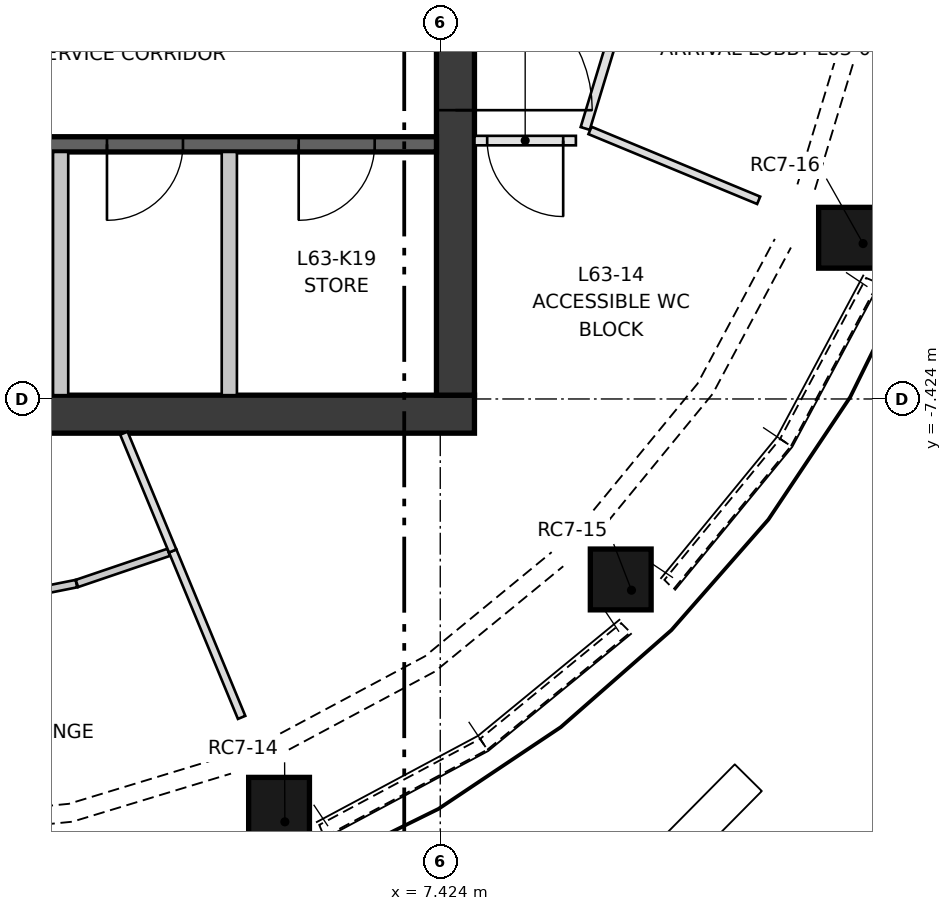
"""IFC4 building model, lengths in metres.
Left out: names, types, materials, properties, quantities, classifications, styles, units other than length and angle.
Written with IfcOpenShell. Run it as: python <this file> out.ifc"""

import sys

from ifc_helpers import new_model, si_unit, direction, frame, frame_2d, origin, origin_2d, place, context, subcontext, project, spatial, polyline, rectangle, outline, extrude, element, fill, save


model = new_model("IFC4")
c1 = context("Model", 3, precision=1e-05, world=origin(), true_north=direction((0.0, 1.0)))
c2 = subcontext(c1, "Body", "Model", "MODEL_VIEW")
j1 = project(units=[si_unit("LENGTHUNIT", "METRE"), si_unit("PLANEANGLEUNIT", "RADIAN")], contexts=[c1])
p1 = place(None, origin())
s1 = spatial("IfcSite", under=j1, at=p1, CompositionType="ELEMENT")
p2 = place(p1, origin())
s2 = spatial("IfcBuilding", under=s1, at=p2, CompositionType="ELEMENT")
p3 = place(p2, frame((0.0, 0.0, 231.2)))
s3 = spatial("IfcBuildingStorey", under=s2, at=p3, CompositionType="ELEMENT", Elevation=231.2)
p4 = place(p3, frame((5.379, -12.987, 0.5), z_axis=(0.0, 0.0, 1.0), x_axis=(-0.923896423382, -0.382642651649, 0.0)))
e1 = element("IfcColumn", 1, at=p4, inside=s3, PredefinedType="COLUMN", context=c2, shape_type="SweptSolid", body=[
    extrude(rectangle(XDim=0.8, YDim=0.8, at=origin_2d()), origin(), (0.0, -0.275, 0.962), 3.328),
])
p5 = place(p3, frame((9.94, -9.94, 0.5), z_axis=(0.0, 0.0, 1.0), x_axis=(-0.707106781187, -0.707106781187, 0.0)))
e2 = element("IfcColumn", 2, at=p5, inside=s3, PredefinedType="COLUMN", context=c2, shape_type="SweptSolid", body=[
    extrude(rectangle(XDim=0.8, YDim=0.8, at=origin_2d()), origin(), (0.0, -0.275, 0.962), 3.328),
])
p6 = place(p3, frame((12.987, -5.379, 0.5), z_axis=(0.0, 0.0, 1.0), x_axis=(-0.382642651649, -0.923896423382, 0.0)))
e3 = element("IfcColumn", 3, at=p6, inside=s3, PredefinedType="COLUMN", context=c2, shape_type="SweptSolid", body=[
    extrude(rectangle(XDim=0.8, YDim=0.8, at=origin_2d()), origin(), (0.0, -0.275, 0.962), 3.328),
])
p7 = place(p3, frame((-7.874, -7.624, 0.0), z_axis=(0.0, 0.0, 1.0), x_axis=(1.0, 0.0, 0.0)))
e4 = element("IfcWall", 4, at=p7, inside=s3, PredefinedType="SHEAR", context=c2, shape_type="SweptSolid", body=[
    extrude(rectangle(XDim=15.748, YDim=0.5, at=frame_2d((7.874, 0.0))), origin(), (0.0, 0.0, 1.0), 3.3),
])
p8 = place(p3, frame((7.624, -7.374, 0.0), z_axis=(0.0, 0.0, 1.0), x_axis=(0.0, 1.0, 0.0)))
e5 = element("IfcWall", 5, at=p8, inside=s3, PredefinedType="SHEAR", context=c2, shape_type="SweptSolid", body=[
    extrude(rectangle(XDim=14.748, YDim=0.5, at=frame_2d((7.374, 0.0))), origin(), (0.0, 0.0, 1.0), 3.3),
])
p9 = place(p8, frame((6.874, 0.0, 0.0)))
e6 = element("IfcOpeningElement", 6, at=p9, cuts=e5, PredefinedType="OPENING", context=c2, shape_type="SweptSolid", body=[
    extrude(rectangle(XDim=1.0, YDim=2.1, at=frame_2d((0.5, 1.05))), frame((0.0, 0.26, 0.0), z_axis=(0.0, -1.0, 0.0), x_axis=(1.0, 0.0, 0.0)), (0.0, 0.0, 1.0), 0.52),
])
p10 = place(p8, frame((3.75, 0.0, 0.0)))
e7 = element("IfcOpeningElement", 7, at=p10, cuts=e5, PredefinedType="OPENING", context=c2, shape_type="SweptSolid", body=[
    extrude(rectangle(XDim=1.8, YDim=2.1, at=frame_2d((0.9, 1.05))), frame((0.0, 0.26, 0.0), z_axis=(0.0, -1.0, 0.0), x_axis=(1.0, 0.0, 0.0)), (0.0, 0.0, 1.0), 0.52),
])
p11 = place(p8, frame((9.198, 0.0, 0.0)))
e8 = element("IfcOpeningElement", 8, at=p11, cuts=e5, PredefinedType="OPENING", context=c2, shape_type="SweptSolid", body=[
    extrude(rectangle(XDim=1.8, YDim=2.1, at=frame_2d((0.9, 1.05))), frame((0.0, 0.26, 0.0), z_axis=(0.0, -1.0, 0.0), x_axis=(1.0, 0.0, 0.0)), (0.0, 0.0, 1.0), 0.52),
])
p12 = place(p3, frame((-7.374, -4.074, 0.0), z_axis=(0.0, 0.0, 1.0), x_axis=(1.0, 0.0, 0.0)))
e9 = element("IfcWall", 9, at=p12, inside=s3, PredefinedType="SHEAR", context=c2, shape_type="SweptSolid", body=[
    extrude(rectangle(XDim=14.748, YDim=0.2, at=frame_2d((7.374, 0.0))), origin(), (0.0, 0.0, 1.0), 3.3),
])
p13 = place(p12, frame((1.319, 0.0, 0.0)))
e10 = element("IfcOpeningElement", 10, at=p13, cuts=e9, PredefinedType="OPENING", context=c2, shape_type="SweptSolid", body=[
    extrude(rectangle(XDim=1.1, YDim=2.1, at=frame_2d((0.55, 1.05))), frame((0.0, 0.11, 0.0), z_axis=(0.0, -1.0, 0.0), x_axis=(1.0, 0.0, 0.0)), (0.0, 0.0, 1.0), 0.22),
])
p14 = place(p12, frame((4.456, 0.0, 0.0)))
e11 = element("IfcOpeningElement", 11, at=p14, cuts=e9, PredefinedType="OPENING", context=c2, shape_type="SweptSolid", body=[
    extrude(rectangle(XDim=1.1, YDim=2.1, at=frame_2d((0.55, 1.05))), frame((0.0, 0.11, 0.0), z_axis=(0.0, -1.0, 0.0), x_axis=(1.0, 0.0, 0.0)), (0.0, 0.0, 1.0), 0.22),
])
p15 = place(p12, frame((7.689, 0.0, 0.0)))
e12 = element("IfcOpeningElement", 12, at=p15, cuts=e9, PredefinedType="OPENING", context=c2, shape_type="SweptSolid", body=[
    extrude(rectangle(XDim=1.0, YDim=2.1, at=frame_2d((0.5, 1.05))), frame((0.0, 0.11, 0.0), z_axis=(0.0, -1.0, 0.0), x_axis=(1.0, 0.0, 0.0)), (0.0, 0.0, 1.0), 0.22),
])
p16 = place(p12, frame((10.413, 0.0, 0.0)))
e13 = element("IfcOpeningElement", 13, at=p16, cuts=e9, PredefinedType="OPENING", context=c2, shape_type="SweptSolid", body=[
    extrude(rectangle(XDim=1.0, YDim=2.1, at=frame_2d((0.5, 1.05))), frame((0.0, 0.11, 0.0), z_axis=(0.0, -1.0, 0.0), x_axis=(1.0, 0.0, 0.0)), (0.0, 0.0, 1.0), 0.22),
])
p17 = place(p12, frame((12.935, 0.0, 0.0)))
e14 = element("IfcOpeningElement", 14, at=p17, cuts=e9, PredefinedType="OPENING", context=c2, shape_type="SweptSolid", body=[
    extrude(rectangle(XDim=1.0, YDim=2.1, at=frame_2d((0.5, 1.05))), frame((0.0, 0.11, 0.0), z_axis=(0.0, -1.0, 0.0), x_axis=(1.0, 0.0, 0.0)), (0.0, 0.0, 1.0), 0.22),
])
for number, where, z_axis, x_axis in (
    (15, (2.429, -7.374, 0.0), (0.0, 0.0, 1.0), (0.0, 1.0, 0.0)),
    (16, (4.649, -7.374, 0.0), (0.0, 0.0, 1.0), (0.0, 1.0, 0.0)),
):
    element("IfcWall", number, at=place(p3, frame(where, z_axis=z_axis, x_axis=x_axis)), inside=s3, PredefinedType="PARTITIONING", context=c2, shape_type="SweptSolid", body=[
        extrude(rectangle(XDim=3.2, YDim=0.2, at=frame_2d((1.6, 0.0))), origin(), (0.0, 0.0, 1.0), 3.3),
    ])
p18 = place(p3, frame((2.824, -14.2, 0.0), z_axis=(0.271074750296, -0.894721380135, 0.354953703573), x_axis=(0.957038883806, 0.289959608839, 1.1226683e-05)))
e17 = element("IfcWall", 17, at=p18, inside=s3, PredefinedType="SOLIDWALL", context=c2, shape_type="SweptSolid", body=[
    extrude(outline(polyline([(0.0, 0.0), (2.434, -5.551e-17), (2.417, 0.481), (0.017, 0.481), (0.0, 0.0)])), origin(), (0.0, 0.0, -1.0), 0.3),
])
p19 = place(p3, frame((5.898, -13.186, 0.0), z_axis=(0.441016524886, -0.824332600798, 0.35493687895), x_axis=(0.881740708382, 0.471734377661, 1.0715603e-05)))
e18 = element("IfcWall", 18, at=p19, inside=s3, PredefinedType="SOLIDWALL", context=c2, shape_type="SweptSolid", body=[
    extrude(outline(polyline([(0.0, 0.0), (2.434, 0.0), (2.417, 0.481), (0.017, 0.481), (0.0, 0.0)])), origin(), (0.0, 0.0, -1.0), 0.3),
])
p20 = place(p3, frame((8.044, -12.038, 0.0), z_axis=(0.59284076781, -0.722862546463, 0.354978257002), x_axis=(0.773221096766, 0.634136527431, -9.701072e-06)))
e19 = element("IfcWall", 19, at=p20, inside=s3, PredefinedType="SOLIDWALL", context=c2, shape_type="SweptSolid", body=[
    extrude(outline(polyline([(0.0, 0.0), (2.434, 5.551e-17), (2.417, 0.481), (0.017, 0.481), (0.0, 0.0)])), origin(), (0.0, 0.0, -1.0), 0.3),
])
p21 = place(p3, frame((10.495, -9.926, 0.0), z_axis=(0.722862546463, -0.59284076781, 0.354978257002), x_axis=(0.634136527431, 0.773221096766, 9.701072e-06)))
e20 = element("IfcWall", 20, at=p21, inside=s3, PredefinedType="SOLIDWALL", context=c2, shape_type="SweptSolid", body=[
    extrude(outline(polyline([(0.0, 0.0), (2.434, -5.551e-17), (2.417, 0.481), (0.017, 0.481), (0.0, 0.0)])), origin(), (0.0, 0.0, -1.0), 0.3),
])
p22 = place(p3, frame((12.038, -8.044, 0.0), z_axis=(0.824402860411, -0.441126603603, 0.354636776631), x_axis=(0.471787066311, 0.881712517728, 1.195964e-05)))
e21 = element("IfcWall", 21, at=p22, inside=s3, PredefinedType="SOLIDWALL", context=c2, shape_type="SweptSolid", body=[
    extrude(outline(polyline([(0.0, 0.0), (2.434, 5.551e-17), (2.417, 0.481), (0.017, 0.481), (0.0, 0.0)])), origin(), (0.0, 0.0, -1.0), 0.3),
])
p23 = place(p3, frame((13.494, -5.154, 0.0), z_axis=(0.894631168658, -0.271094631402, 0.355165838574), x_axis=(0.290000037325, 0.957026634075, 4.815507e-06)))
e22 = element("IfcWall", 22, at=p23, inside=s3, PredefinedType="SOLIDWALL", context=c2, shape_type="SweptSolid", body=[
    extrude(outline(polyline([(0.0, 0.0), (2.434, 0.0), (2.417, 0.481), (0.017, 0.481), (0.0, 0.0)])), origin(), (0.0, 0.0, -1.0), 0.3),
])
p24 = place(p3, frame((9.904, -1.976, 0.0), z_axis=(0.0, 0.0, 1.0), x_axis=(-0.290206520171, -0.956964040939, 0.0)))
e23 = element("IfcWall", 23, at=p24, inside=s3, PredefinedType="PARTITIONING", context=c2, shape_type="SweptSolid", body=[
    extrude(rectangle(XDim=1.974, YDim=0.125, at=frame_2d((0.987, 0.0))), origin(), (0.0, 0.0, 1.0), 3.3),
])
p25 = place(p3, frame((9.208, -4.024, 0.0), z_axis=(0.0, 0.0, 1.0), x_axis=(-1.0, 0.0, 0.0)))
e24 = element("IfcWall", 24, at=p25, inside=s3, PredefinedType="PARTITIONING", context=c2, shape_type="SweptSolid", body=[
    extrude(rectangle(XDim=1.334, YDim=0.125, at=frame_2d((0.667, 0.0))), origin(), (0.0, 0.0, 1.0), 3.3),
])
p26 = place(p25, frame((0.167, 0.0, 0.0)))
e25 = element("IfcOpeningElement", 25, at=p26, cuts=e24, PredefinedType="OPENING", context=c2, shape_type="SweptSolid", body=[
    extrude(rectangle(XDim=1.0, YDim=2.1, at=frame_2d((0.5, 1.05))), frame((0.0, 0.073, 0.0), z_axis=(0.0, -1.0, 0.0), x_axis=(1.0, 0.0, 0.0)), (0.0, 0.0, 1.0), 0.145),
])
p27 = place(p3, frame((11.613, -4.81, 0.0), z_axis=(0.0, 0.0, 1.0), x_axis=(-0.923886765284, 0.38266597044, 0.0)))
e26 = element("IfcWall", 26, at=p27, inside=s3, PredefinedType="PARTITIONING", context=c2, shape_type="SweptSolid", body=[
    extrude(rectangle(XDim=2.402, YDim=0.105, at=frame_2d((1.201, 0.0))), origin(), (0.0, 0.0, 1.0), 3.3),
])
p28 = place(p3, frame((1.335, -10.112, 0.0), z_axis=(0.0, 0.0, 1.0), x_axis=(0.980778229799, 0.195125764451, 0.0)))
e27 = element("IfcWall", 27, at=p28, inside=s3, PredefinedType="PARTITIONING", context=c2, shape_type="SweptSolid", body=[
    extrude(rectangle(XDim=1.328, YDim=0.1, at=frame_2d((0.664, 0.0))), origin(), (0.0, 0.0, 1.0), 3.3),
])
p29 = place(p3, frame((2.643, -9.851, 0.0), z_axis=(0.0, 0.0, 1.0), x_axis=(0.946984941769, 0.321277948299, 0.0)))
e28 = element("IfcWall", 28, at=p29, inside=s3, PredefinedType="PARTITIONING", context=c2, shape_type="SweptSolid", body=[
    extrude(rectangle(XDim=1.275, YDim=0.1, at=frame_2d((0.638, 0.0))), origin(), (0.0, 0.0, 1.0), 3.3),
])
p30 = place(p3, frame((3.903, -9.424, 0.0), z_axis=(0.0, 0.0, 1.0), x_axis=(0.382676271808, -0.923882498479, 0.0)))
e29 = element("IfcWall", 29, at=p30, inside=s3, PredefinedType="PARTITIONING", context=c2, shape_type="SweptSolid", body=[
    extrude(rectangle(XDim=2.37, YDim=0.105, at=frame_2d((1.185, 0.0))), origin(), (0.0, 0.0, 1.0), 3.3),
])
p31 = place(p3, frame((3.261, -7.874, 0.0), z_axis=(0.0, 0.0, 1.0), x_axis=(0.382681757498, -0.923880226262, 0.0)))
e30 = element("IfcWall", 30, at=p31, inside=s3, PredefinedType="PARTITIONING", context=c2, shape_type="SweptSolid", body=[
    extrude(rectangle(XDim=1.677, YDim=0.105, at=frame_2d((0.839, 0.0))), origin(), (0.0, 0.0, 1.0), 3.3),
])
p32 = place(p16, frame((1.0, 0.0, 0.0), z_axis=(0.0, 0.0, 1.0), x_axis=(-1.0, 0.0, 0.0)))
e31 = element("IfcDoor", 31, at=p32, inside=s3, OperationType="SINGLE_SWING_LEFT", PredefinedType="DOOR", context=c2, shape_type="SweptSolid", body=[
    extrude(rectangle(XDim=1.0, YDim=2.1, at=frame_2d((0.5, 1.05))), frame((0.0, 0.025, 0.0), z_axis=(0.0, -1.0, 0.0), x_axis=(1.0, 0.0, 0.0)), (0.0, 0.0, 1.0), 0.05),
])
fill(e13, e31)
p33 = place(p17, frame((1.0, 0.0, 0.0), z_axis=(0.0, 0.0, 1.0), x_axis=(-1.0, 0.0, 0.0)))
e32 = element("IfcDoor", 32, at=p33, inside=s3, OperationType="SINGLE_SWING_LEFT", PredefinedType="DOOR", context=c2, shape_type="SweptSolid", body=[
    extrude(rectangle(XDim=1.0, YDim=2.1, at=frame_2d((0.5, 1.05))), frame((0.0, 0.025, 0.0), z_axis=(0.0, -1.0, 0.0), x_axis=(1.0, 0.0, 0.0)), (0.0, 0.0, 1.0), 0.05),
])
fill(e14, e32)
p34 = place(p10, frame((1.8, 0.0, 0.0), z_axis=(0.0, 0.0, 1.0), x_axis=(-1.0, 0.0, 0.0)))
e33 = element("IfcDoor", 33, at=p34, inside=s3, OperationType="DOUBLE_DOOR_SINGLE_SWING", PredefinedType="DOOR", context=c2, shape_type="SweptSolid", body=[
    extrude(rectangle(XDim=1.8, YDim=2.1, at=frame_2d((0.9, 1.05))), frame((0.0, 0.025, 0.0), z_axis=(0.0, -1.0, 0.0), x_axis=(1.0, 0.0, 0.0)), (0.0, 0.0, 1.0), 0.05),
])
fill(e7, e33)
p35 = place(p26, origin())
e34 = element("IfcDoor", 34, at=p35, inside=s3, OperationType="SINGLE_SWING_LEFT", PredefinedType="DOOR", context=c2, shape_type="SweptSolid", body=[
    extrude(rectangle(XDim=1.0, YDim=2.1, at=frame_2d((0.5, 1.05))), frame((0.0, 0.025, 0.0), z_axis=(0.0, -1.0, 0.0), x_axis=(1.0, 0.0, 0.0)), (0.0, 0.0, 1.0), 0.05),
])
fill(e25, e34)
save(model, sys.argv[1])
